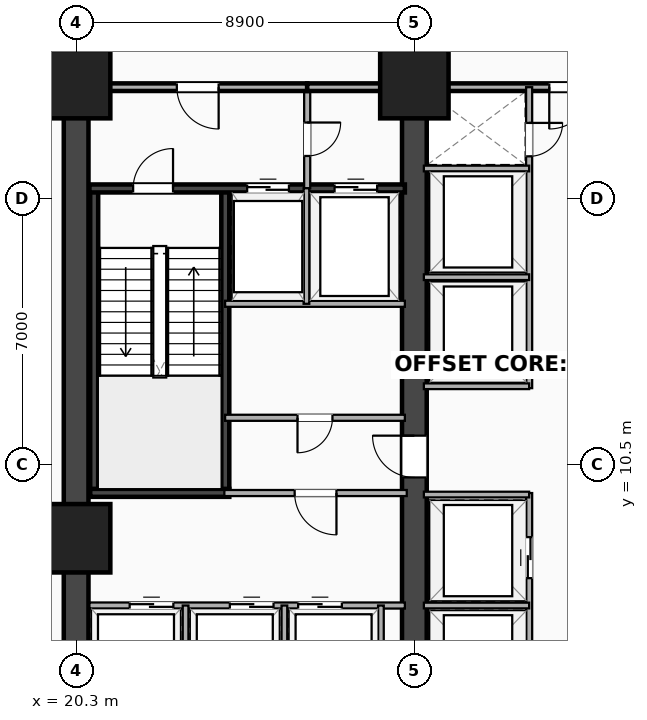
"""IFC4 building model, lengths in metres.
Left out: names, types, materials, properties, quantities, classifications, styles, units other than length and angle.
Written with IfcOpenShell. Run it as: python <this file> out.ifc"""

import sys

from ifc_helpers import new_model, si_unit, direction, frame, frame_2d, origin, origin_2d, place, context, subcontext, project, spatial, rectangle, extrude, element, fill, save


model = new_model("IFC4")
c1 = context("Model", 3, precision=1e-05, world=origin(), true_north=direction((0.0, 1.0)))
c2 = subcontext(c1, "Body", "Model", "MODEL_VIEW")
j1 = project(units=[si_unit("LENGTHUNIT", "METRE"), si_unit("PLANEANGLEUNIT", "RADIAN")], contexts=[c1])
p1 = place(None, origin())
s1 = spatial("IfcSite", under=j1, at=p1, CompositionType="ELEMENT")
p2 = place(p1, origin())
s2 = spatial("IfcBuilding", under=s1, at=p2, CompositionType="ELEMENT")
p3 = place(p2, frame((0.0, 0.0, 5.4)))
s3 = spatial("IfcBuildingStorey", under=s2, at=p3, CompositionType="ELEMENT", Elevation=5.4)
p4 = place(p3, frame((20.3, 3.5, 0.0), z_axis=(0.0, 0.0, 1.0), x_axis=(0.0, 1.0, 0.0)))
e1 = element("IfcWall", 1, at=p4, inside=s3, PredefinedType="SHEAR", context=c2, shape_type="SweptSolid", body=[
    extrude(rectangle(XDim=16.9, YDim=0.65, at=frame_2d((8.45, 0.0))), origin(), (0.0, 0.0, 1.0), 4.3),
])
p5 = place(p3, frame((29.2, 3.5, 0.0), z_axis=(0.0, 0.0, 1.0), x_axis=(0.0, 1.0, 0.0)))
e2 = element("IfcWall", 2, at=p5, inside=s3, PredefinedType="SHEAR", context=c2, shape_type="SweptSolid", body=[
    extrude(rectangle(XDim=16.9, YDim=0.65, at=frame_2d((8.45, 0.0))), origin(), (0.0, 0.0, 1.0), 4.3),
])
p6 = place(p5, frame((7.75, 0.0, 0.0), z_axis=(0.0, 0.0, 1.0), x_axis=(-1.0, 0.0, 0.0)))
e3 = element("IfcOpeningElement", 3, at=p6, cuts=e2, PredefinedType="OPENING", context=c2, shape_type="SweptSolid", body=[
    extrude(rectangle(XDim=1.1, YDim=2.15, at=frame_2d((0.55, 1.075))), frame((0.0, 0.335, 0.0), z_axis=(0.0, -1.0, 0.0), x_axis=(1.0, 0.0, 0.0)), (0.0, 0.0, 1.0), 0.67),
])
for number, where, z_axis, x_axis in (
    (4, (20.775, 9.745, 0.0), (0.0, 0.0, 1.0), (0.0, 1.0, 0.0)),
    (5, (24.225, 9.745, 0.0), (0.0, 0.0, 1.0), (0.0, 1.0, 0.0)),
):
    element("IfcWall", number, at=place(p3, frame(where, z_axis=z_axis, x_axis=x_axis)), inside=s3, PredefinedType="SHEAR", context=c2, shape_type="SweptSolid", body=[
        extrude(rectangle(XDim=8.01, YDim=0.21, at=frame_2d((4.005, 0.0))), origin(), (0.0, 0.0, 1.0), 4.3),
    ])
p7 = place(p3, frame((20.67, 9.745, 0.0), z_axis=(0.0, 0.0, 1.0), x_axis=(1.0, 0.0, 0.0)))
e6 = element("IfcWall", 6, at=p7, inside=s3, PredefinedType="SHEAR", context=c2, shape_type="SweptSolid", body=[
    extrude(rectangle(XDim=3.66, YDim=0.21, at=frame_2d((1.83, 0.0))), origin(), (0.0, 0.0, 1.0), 4.3),
])
p8 = place(p3, frame((20.65, 17.755, 0.0), z_axis=(0.0, 0.0, 1.0), x_axis=(1.0, 0.0, 0.0)))
e7 = element("IfcWall", 7, at=p8, inside=s3, PredefinedType="SHEAR", context=c2, shape_type="SweptSolid", body=[
    extrude(rectangle(XDim=8.3, YDim=0.21, at=frame_2d((4.15, 0.0))), origin(), (0.0, 0.0, 1.0), 4.3),
])
p9 = place(p8, frame((2.2, 0.0, 0.0), z_axis=(0.0, 0.0, 1.0), x_axis=(-1.0, 0.0, 0.0)))
e8 = element("IfcOpeningElement", 8, at=p9, cuts=e7, PredefinedType="OPENING", context=c2, shape_type="SweptSolid", body=[
    extrude(rectangle(XDim=1.05, YDim=2.15, at=frame_2d((0.525, 1.075))), frame((0.0, 0.115, 0.0), z_axis=(0.0, -1.0, 0.0), x_axis=(1.0, 0.0, 0.0)), (0.0, 0.0, 1.0), 0.23),
])
p10 = place(p8, frame((4.15, 0.0, 0.0)))
e9 = element("IfcOpeningElement", 9, at=p10, cuts=e7, PredefinedType="OPENING", context=c2, shape_type="SweptSolid", body=[
    extrude(rectangle(XDim=1.1, YDim=2.18, at=frame_2d((0.55, 1.09))), frame((0.0, 0.115, 0.0), z_axis=(0.0, -1.0, 0.0), x_axis=(1.0, 0.0, 0.0)), (0.0, 0.0, 1.0), 0.23),
])
p11 = place(p8, frame((6.45, 0.0, 0.0)))
e10 = element("IfcOpeningElement", 10, at=p11, cuts=e7, PredefinedType="OPENING", context=c2, shape_type="SweptSolid", body=[
    extrude(rectangle(XDim=1.12, YDim=2.2, at=frame_2d((0.56, 1.1))), frame((0.0, 0.115, 0.0), z_axis=(0.0, -1.0, 0.0), x_axis=(1.0, 0.0, 0.0)), (0.0, 0.0, 1.0), 0.23),
])
for number, where, z_axis, x_axis in (
    (11, (20.3, 8.55, -0.3), (0.0, 0.0, 1.0), (1.0, 0.0, 0.0)),
    (12, (20.3, 20.5, -0.3), (0.0, 0.0, 1.0), (1.0, 0.0, 0.0)),
    (13, (29.2, 20.5, -0.3), (0.0, 0.0, 1.0), (1.0, 0.0, 0.0)),
):
    element("IfcColumn", number, at=place(p3, frame(where, z_axis=z_axis, x_axis=x_axis)), inside=s3, PredefinedType="COLUMN", context=c2, shape_type="SweptSolid", body=[
        extrude(rectangle(XDim=1.8, YDim=1.8, at=origin_2d()), origin(), (0.0, 0.0, 1.0), 4.6),
    ])
p12 = place(p3, frame((26.38, 17.76, 0.0), z_axis=(0.0, 0.0, 1.0), x_axis=(0.0, 1.0, 0.0)))
e14 = element("IfcWall", 14, at=p12, inside=s3, PredefinedType="PARTITIONING", context=c2, shape_type="SweptSolid", body=[
    extrude(rectangle(XDim=2.66, YDim=0.16, at=frame_2d((1.33, 0.0))), origin(), (0.0, 0.0, 1.0), 2.635),
])
p13 = place(p12, frame((0.85, 0.0, 0.0)))
e15 = element("IfcOpeningElement", 15, at=p13, cuts=e14, PredefinedType="OPENING", context=c2, shape_type="SweptSolid", body=[
    extrude(rectangle(XDim=0.88, YDim=2.08, at=frame_2d((0.44, 1.04))), frame((0.0, 0.09, 0.0), z_axis=(0.0, -1.0, 0.0), x_axis=(1.0, 0.0, 0.0)), (0.0, 0.0, 1.0), 0.18),
])
p14 = place(p3, frame((24.22, 14.72, 0.0), z_axis=(0.0, 0.0, 1.0), x_axis=(1.0, 0.0, 0.0)))
e16 = element("IfcWall", 16, at=p14, inside=s3, PredefinedType="PARTITIONING", context=c2, shape_type="SweptSolid", body=[
    extrude(rectangle(XDim=4.73, YDim=0.16, at=frame_2d((2.365, 0.0))), origin(), (0.0, 0.0, 1.0), 3.43),
])
p15 = place(p3, frame((26.36, 14.72, 0.0), z_axis=(0.0, 0.0, 1.0), x_axis=(0.0, 1.0, 0.0)))
e17 = element("IfcWall", 17, at=p15, inside=s3, PredefinedType="PARTITIONING", context=c2, shape_type="SweptSolid", body=[
    extrude(rectangle(XDim=3.04, YDim=0.15, at=frame_2d((1.52, 0.0))), origin(), (0.0, 0.0, 1.0), 4.3),
])
p16 = place(p3, frame((20.65, 20.42, 0.0), z_axis=(0.0, 0.0, 1.0), x_axis=(1.0, 0.0, 0.0)))
e18 = element("IfcWall", 18, at=p16, inside=s3, PredefinedType="PARTITIONING", context=c2, shape_type="SweptSolid", body=[
    extrude(rectangle(XDim=5.73, YDim=0.2, at=frame_2d((2.865, 0.0))), origin(), (0.0, 0.0, 1.0), 2.635),
])
p17 = place(p16, frame((2.3, 0.0, 0.0)))
e19 = element("IfcOpeningElement", 19, at=p17, cuts=e18, PredefinedType="OPENING", context=c2, shape_type="SweptSolid", body=[
    extrude(rectangle(XDim=1.1, YDim=2.15, at=frame_2d((0.55, 1.075))), frame((0.0, 0.11, 0.0), z_axis=(0.0, -1.0, 0.0), x_axis=(1.0, 0.0, 0.0)), (0.0, 0.0, 1.0), 0.22),
])
p18 = place(p3, frame((26.38, 20.42, 0.0), z_axis=(0.0, 0.0, 1.0), x_axis=(1.0, 0.0, 0.0)))
e20 = element("IfcWall", 20, at=p18, inside=s3, PredefinedType="PARTITIONING", context=c2, shape_type="SweptSolid", body=[
    extrude(rectangle(XDim=2.82, YDim=0.2, at=frame_2d((1.41, 0.0))), origin(), (0.0, 0.0, 1.0), 2.635),
])
p19 = place(p3, frame((29.2, 20.42, 0.0), z_axis=(0.0, 0.0, 1.0), x_axis=(1.0, 0.0, 0.0)))
e21 = element("IfcWall", 21, at=p19, inside=s3, PredefinedType="PARTITIONING", context=c2, shape_type="SweptSolid", body=[
    extrude(rectangle(XDim=7.8, YDim=0.2, at=frame_2d((3.9, 0.0))), origin(), (0.0, 0.0, 1.0), 2.635),
])
p20 = place(p19, frame((3.55, 0.0, 0.0)))
e22 = element("IfcOpeningElement", 22, at=p20, cuts=e21, PredefinedType="OPENING", context=c2, shape_type="SweptSolid", body=[
    extrude(rectangle(XDim=1.1, YDim=2.15, at=frame_2d((0.55, 1.075))), frame((0.0, 0.11, 0.0), z_axis=(0.0, -1.0, 0.0), x_axis=(1.0, 0.0, 0.0)), (0.0, 0.0, 1.0), 0.22),
])
p21 = place(p3, frame((24.22, 11.72, 0.0), z_axis=(0.0, 0.0, 1.0), x_axis=(1.0, 0.0, 0.0)))
e23 = element("IfcWall", 23, at=p21, inside=s3, PredefinedType="PARTITIONING", context=c2, shape_type="SweptSolid", body=[
    extrude(rectangle(XDim=4.73, YDim=0.16, at=frame_2d((2.365, 0.0))), origin(), (0.0, 0.0, 1.0), 3.43),
])
p22 = place(p21, frame((1.905, 0.0, 0.0)))
e24 = element("IfcOpeningElement", 24, at=p22, cuts=e23, PredefinedType="OPENING", context=c2, shape_type="SweptSolid", body=[
    extrude(rectangle(XDim=0.92, YDim=2.08, at=frame_2d((0.46, 1.04))), frame((0.0, 0.09, 0.0), z_axis=(0.0, -1.0, 0.0), x_axis=(1.0, 0.0, 0.0)), (0.0, 0.0, 1.0), 0.18),
])
p23 = place(p3, frame((20.65, 6.78, 0.0), z_axis=(0.0, 0.0, 1.0), x_axis=(1.0, 0.0, 0.0)))
e25 = element("IfcWall", 25, at=p23, inside=s3, PredefinedType="PARTITIONING", context=c2, shape_type="SweptSolid", body=[
    extrude(rectangle(XDim=8.3, YDim=0.16, at=frame_2d((4.15, 0.0))), origin(), (0.0, 0.0, 1.0), 3.43),
])
p24 = place(p23, frame((3.695, 0.0, 0.0)))
e26 = element("IfcOpeningElement", 26, at=p24, cuts=e25, PredefinedType="OPENING", context=c2, shape_type="SweptSolid", body=[
    extrude(rectangle(XDim=1.15, YDim=2.2, at=frame_2d((0.575, 1.1))), frame((0.0, 0.09, 0.0), z_axis=(0.0, -1.0, 0.0), x_axis=(1.0, 0.0, 0.0)), (0.0, 0.0, 1.0), 0.18),
])
p25 = place(p23, frame((5.492, 0.0, 0.0)))
e27 = element("IfcOpeningElement", 27, at=p25, cuts=e25, PredefinedType="OPENING", context=c2, shape_type="SweptSolid", body=[
    extrude(rectangle(XDim=1.15, YDim=2.2, at=frame_2d((0.575, 1.1))), frame((0.0, 0.09, 0.0), z_axis=(0.0, -1.0, 0.0), x_axis=(1.0, 0.0, 0.0)), (0.0, 0.0, 1.0), 0.18),
])
p26 = place(p23, frame((1.059, 0.0, 0.0)))
e28 = element("IfcOpeningElement", 28, at=p26, cuts=e25, PredefinedType="OPENING", context=c2, shape_type="SweptSolid", body=[
    extrude(rectangle(XDim=1.15, YDim=2.2, at=frame_2d((0.575, 1.1))), frame((0.0, 0.09, 0.0), z_axis=(0.0, -1.0, 0.0), x_axis=(1.0, 0.0, 0.0)), (0.0, 0.0, 1.0), 0.18),
])
for number, where, z_axis, x_axis in (
    (29, (23.18, 3.9, 0.0), (0.0, 0.0, 1.0), (0.0, 1.0, 0.0)),
    (30, (25.78, 3.9, 0.0), (0.0, 0.0, 1.0), (0.0, 1.0, 0.0)),
    (31, (28.32, 3.9, 0.0), (0.0, 0.0, 1.0), (0.0, 1.0, 0.0)),
):
    element("IfcWall", number, at=place(p3, frame(where, z_axis=z_axis, x_axis=x_axis)), inside=s3, PredefinedType="PARTITIONING", context=c2, shape_type="SweptSolid", body=[
        extrude(rectangle(XDim=2.88, YDim=0.15, at=frame_2d((1.44, 0.0))), origin(), (0.0, 0.0, 1.0), 3.373),
    ])
p27 = place(p3, frame((24.2, 9.74, 0.0), z_axis=(0.0, 0.0, 1.0), x_axis=(1.0, 0.0, 0.0)))
e32 = element("IfcWall", 32, at=p27, inside=s3, PredefinedType="PARTITIONING", context=c2, shape_type="SweptSolid", body=[
    extrude(rectangle(XDim=4.8, YDim=0.16, at=frame_2d((2.4, 0.0))), origin(), (0.0, 0.0, 1.0), 3.43),
])
p28 = place(p27, frame((1.85, 0.0, 0.0)))
e33 = element("IfcOpeningElement", 33, at=p28, cuts=e32, PredefinedType="OPENING", context=c2, shape_type="SweptSolid", body=[
    extrude(rectangle(XDim=1.1, YDim=2.15, at=frame_2d((0.55, 1.075))), frame((0.0, 0.09, 0.0), z_axis=(0.0, -1.0, 0.0), x_axis=(1.0, 0.0, 0.0)), (0.0, 0.0, 1.0), 0.18),
])
p29 = place(p3, frame((32.22, 3.9, 0.0), z_axis=(0.0, 0.0, 1.0), x_axis=(0.0, 1.0, 0.0)))
e34 = element("IfcWall", 34, at=p29, inside=s3, PredefinedType="PARTITIONING", context=c2, shape_type="SweptSolid", body=[
    extrude(rectangle(XDim=5.84, YDim=0.16, at=frame_2d((2.92, 0.0))), origin(), (0.0, 0.0, 1.0), 3.373),
])
p30 = place(p29, frame((1.78, 0.0, 0.0), z_axis=(0.0, 0.0, 1.0), x_axis=(-1.0, 0.0, 0.0)))
e35 = element("IfcOpeningElement", 35, at=p30, cuts=e34, PredefinedType="OPENING", context=c2, shape_type="SweptSolid", body=[
    extrude(rectangle(XDim=1.08, YDim=2.16, at=frame_2d((0.54, 1.08))), frame((0.0, 0.09, 0.0), z_axis=(0.0, -1.0, 0.0), x_axis=(1.0, 0.0, 0.0)), (0.0, 0.0, 1.0), 0.18),
])
p31 = place(p29, frame((4.68, 0.0, 0.0), z_axis=(0.0, 0.0, 1.0), x_axis=(-1.0, 0.0, 0.0)))
e36 = element("IfcOpeningElement", 36, at=p31, cuts=e34, PredefinedType="OPENING", context=c2, shape_type="SweptSolid", body=[
    extrude(rectangle(XDim=1.08, YDim=2.16, at=frame_2d((0.54, 1.08))), frame((0.0, 0.09, 0.0), z_axis=(0.0, -1.0, 0.0), x_axis=(1.0, 0.0, 0.0)), (0.0, 0.0, 1.0), 0.18),
])
for number, where, z_axis, x_axis in (
    (37, (29.45, 6.78, 0.0), (0.0, 0.0, 1.0), (1.0, 0.0, 0.0)),
    (38, (29.45, 9.7, 0.0), (0.0, 0.0, 1.0), (1.0, 0.0, 0.0)),
):
    element("IfcWall", number, at=place(p3, frame(where, z_axis=z_axis, x_axis=x_axis)), inside=s3, PredefinedType="PARTITIONING", context=c2, shape_type="SweptSolid", body=[
        extrude(rectangle(XDim=2.77, YDim=0.15, at=frame_2d((1.385, 0.0))), origin(), (0.0, 0.0, 1.0), 3.43),
    ])
p32 = place(p3, frame((32.22, 12.5, 0.0), z_axis=(0.0, 0.0, 1.0), x_axis=(0.0, 1.0, 0.0)))
e39 = element("IfcWall", 39, at=p32, inside=s3, PredefinedType="PARTITIONING", context=c2, shape_type="SweptSolid", body=[
    extrude(rectangle(XDim=7.92, YDim=0.16, at=frame_2d((3.96, 0.0))), origin(), (0.0, 0.0, 1.0), 3.373),
])
p33 = place(p32, frame((6.1, 0.0, 0.0)))
e40 = element("IfcOpeningElement", 40, at=p33, cuts=e39, PredefinedType="OPENING", context=c2, shape_type="SweptSolid", body=[
    extrude(rectangle(XDim=0.88, YDim=2.08, at=frame_2d((0.44, 1.04))), frame((0.0, 0.09, 0.0), z_axis=(0.0, -1.0, 0.0), x_axis=(1.0, 0.0, 0.0)), (0.0, 0.0, 1.0), 0.18),
])
for number, where, z_axis, x_axis in (
    (41, (29.45, 12.55, 0.0), (0.0, 0.0, 1.0), (1.0, 0.0, 0.0)),
    (42, (29.45, 15.42, 0.0), (0.0, 0.0, 1.0), (1.0, 0.0, 0.0)),
    (43, (29.45, 18.28, 0.0), (0.0, 0.0, 1.0), (1.0, 0.0, 0.0)),
):
    element("IfcWall", number, at=place(p3, frame(where, z_axis=z_axis, x_axis=x_axis)), inside=s3, PredefinedType="PARTITIONING", context=c2, shape_type="SweptSolid", body=[
        extrude(rectangle(XDim=2.77, YDim=0.15, at=frame_2d((1.385, 0.0))), origin(), (0.0, 0.0, 1.0), 3.43),
    ])
p34 = place(p3, frame((17.9, 20.42, 0.0), z_axis=(0.0, 0.0, 1.0), x_axis=(1.0, 0.0, 0.0)))
e44 = element("IfcWall", 44, at=p34, inside=s3, PredefinedType="PARTITIONING", context=c2, shape_type="SweptSolid", body=[
    extrude(rectangle(XDim=2.4, YDim=0.18, at=frame_2d((1.2, 0.0))), origin(), (0.0, 0.0, 1.0), 2.635),
])
p35 = place(p9, origin())
e45 = element("IfcDoor", 45, at=p35, inside=s3, OperationType="SINGLE_SWING_RIGHT", PredefinedType="DOOR", context=c2, shape_type="SweptSolid", body=[
    extrude(rectangle(XDim=1.05, YDim=2.15, at=frame_2d((0.525, 1.075))), frame((0.0, 0.025, 0.0), z_axis=(0.0, -1.0, 0.0), x_axis=(1.0, 0.0, 0.0)), (0.0, 0.0, 1.0), 0.05),
])
fill(e8, e45)
p36 = place(p10, origin())
e46 = element("IfcDoor", 46, at=p36, inside=s3, OperationType="DOUBLE_DOOR_SLIDING", PredefinedType="DOOR", context=c2, shape_type="SweptSolid", body=[
    extrude(rectangle(XDim=1.1, YDim=2.18, at=frame_2d((0.55, 1.09))), frame((0.0, 0.025, 0.0), z_axis=(0.0, -1.0, 0.0), x_axis=(1.0, 0.0, 0.0)), (0.0, 0.0, 1.0), 0.05),
])
fill(e9, e46)
p37 = place(p11, origin())
e47 = element("IfcDoor", 47, at=p37, inside=s3, OperationType="DOUBLE_DOOR_SLIDING", PredefinedType="DOOR", context=c2, shape_type="SweptSolid", body=[
    extrude(rectangle(XDim=1.12, YDim=2.2, at=frame_2d((0.56, 1.1))), frame((0.0, 0.025, 0.0), z_axis=(0.0, -1.0, 0.0), x_axis=(1.0, 0.0, 0.0)), (0.0, 0.0, 1.0), 0.05),
])
fill(e10, e47)
p38 = place(p6, origin())
e48 = element("IfcDoor", 48, at=p38, inside=s3, OperationType="SINGLE_SWING_RIGHT", PredefinedType="DOOR", context=c2, shape_type="SweptSolid", body=[
    extrude(rectangle(XDim=1.1, YDim=2.15, at=frame_2d((0.55, 1.075))), frame((0.0, 0.025, 0.0), z_axis=(0.0, -1.0, 0.0), x_axis=(1.0, 0.0, 0.0)), (0.0, 0.0, 1.0), 0.05),
])
fill(e3, e48)
p39 = place(p13, origin())
e49 = element("IfcDoor", 49, at=p39, inside=s3, OperationType="SINGLE_SWING_RIGHT", PredefinedType="DOOR", context=c2, shape_type="SweptSolid", body=[
    extrude(rectangle(XDim=0.88, YDim=2.08, at=frame_2d((0.44, 1.04))), frame((0.0, 0.025, 0.0), z_axis=(0.0, -1.0, 0.0), x_axis=(1.0, 0.0, 0.0)), (0.0, 0.0, 1.0), 0.05),
])
fill(e15, e49)
p40 = place(p17, origin())
e50 = element("IfcDoor", 50, at=p40, inside=s3, OperationType="SINGLE_SWING_RIGHT", PredefinedType="DOOR", context=c2, shape_type="SweptSolid", body=[
    extrude(rectangle(XDim=1.1, YDim=2.15, at=frame_2d((0.55, 1.075))), frame((0.0, 0.025, 0.0), z_axis=(0.0, -1.0, 0.0), x_axis=(1.0, 0.0, 0.0)), (0.0, 0.0, 1.0), 0.05),
])
fill(e19, e50)
p41 = place(p20, origin())
e51 = element("IfcDoor", 51, at=p41, inside=s3, OperationType="SINGLE_SWING_LEFT", PredefinedType="DOOR", context=c2, shape_type="SweptSolid", body=[
    extrude(rectangle(XDim=1.1, YDim=2.15, at=frame_2d((0.55, 1.075))), frame((0.0, 0.025, 0.0), z_axis=(0.0, -1.0, 0.0), x_axis=(1.0, 0.0, 0.0)), (0.0, 0.0, 1.0), 0.05),
])
fill(e22, e51)
p42 = place(p22, origin())
e52 = element("IfcDoor", 52, at=p42, inside=s3, OperationType="SINGLE_SWING_LEFT", PredefinedType="DOOR", context=c2, shape_type="SweptSolid", body=[
    extrude(rectangle(XDim=0.92, YDim=2.08, at=frame_2d((0.46, 1.04))), frame((0.0, 0.025, 0.0), z_axis=(0.0, -1.0, 0.0), x_axis=(1.0, 0.0, 0.0)), (0.0, 0.0, 1.0), 0.05),
])
fill(e24, e52)
p43 = place(p24, origin())
e53 = element("IfcDoor", 53, at=p43, inside=s3, OperationType="DOUBLE_DOOR_SLIDING", PredefinedType="DOOR", context=c2, shape_type="SweptSolid", body=[
    extrude(rectangle(XDim=1.15, YDim=2.2, at=frame_2d((0.575, 1.1))), frame((0.0, 0.025, 0.0), z_axis=(0.0, -1.0, 0.0), x_axis=(1.0, 0.0, 0.0)), (0.0, 0.0, 1.0), 0.05),
])
fill(e26, e53)
p44 = place(p25, origin())
e54 = element("IfcDoor", 54, at=p44, inside=s3, OperationType="DOUBLE_DOOR_SLIDING", PredefinedType="DOOR", context=c2, shape_type="SweptSolid", body=[
    extrude(rectangle(XDim=1.15, YDim=2.2, at=frame_2d((0.575, 1.1))), frame((0.0, 0.025, 0.0), z_axis=(0.0, -1.0, 0.0), x_axis=(1.0, 0.0, 0.0)), (0.0, 0.0, 1.0), 0.05),
])
fill(e27, e54)
p45 = place(p26, origin())
e55 = element("IfcDoor", 55, at=p45, inside=s3, OperationType="DOUBLE_DOOR_SLIDING", PredefinedType="DOOR", context=c2, shape_type="SweptSolid", body=[
    extrude(rectangle(XDim=1.15, YDim=2.2, at=frame_2d((0.575, 1.1))), frame((0.0, 0.025, 0.0), z_axis=(0.0, -1.0, 0.0), x_axis=(1.0, 0.0, 0.0)), (0.0, 0.0, 1.0), 0.05),
])
fill(e28, e55)
p46 = place(p28, origin())
e56 = element("IfcDoor", 56, at=p46, inside=s3, OperationType="SINGLE_SWING_RIGHT", PredefinedType="DOOR", context=c2, shape_type="SweptSolid", body=[
    extrude(rectangle(XDim=1.1, YDim=2.15, at=frame_2d((0.55, 1.075))), frame((0.0, 0.025, 0.0), z_axis=(0.0, -1.0, 0.0), x_axis=(1.0, 0.0, 0.0)), (0.0, 0.0, 1.0), 0.05),
])
fill(e33, e56)
p47 = place(p31, origin())
e57 = element("IfcDoor", 57, at=p47, inside=s3, OperationType="DOUBLE_DOOR_SLIDING", PredefinedType="DOOR", context=c2, shape_type="SweptSolid", body=[
    extrude(rectangle(XDim=1.08, YDim=2.16, at=frame_2d((0.54, 1.08))), frame((0.0, 0.025, 0.0), z_axis=(0.0, -1.0, 0.0), x_axis=(1.0, 0.0, 0.0)), (0.0, 0.0, 1.0), 0.05),
])
fill(e36, e57)
p48 = place(p33, origin())
e58 = element("IfcDoor", 58, at=p48, inside=s3, OperationType="SINGLE_SWING_RIGHT", PredefinedType="DOOR", context=c2, shape_type="SweptSolid", body=[
    extrude(rectangle(XDim=0.88, YDim=2.08, at=frame_2d((0.44, 1.04))), frame((0.0, 0.025, 0.0), z_axis=(0.0, -1.0, 0.0), x_axis=(1.0, 0.0, 0.0)), (0.0, 0.0, 1.0), 0.05),
])
fill(e40, e58)
save(model, sys.argv[1])
